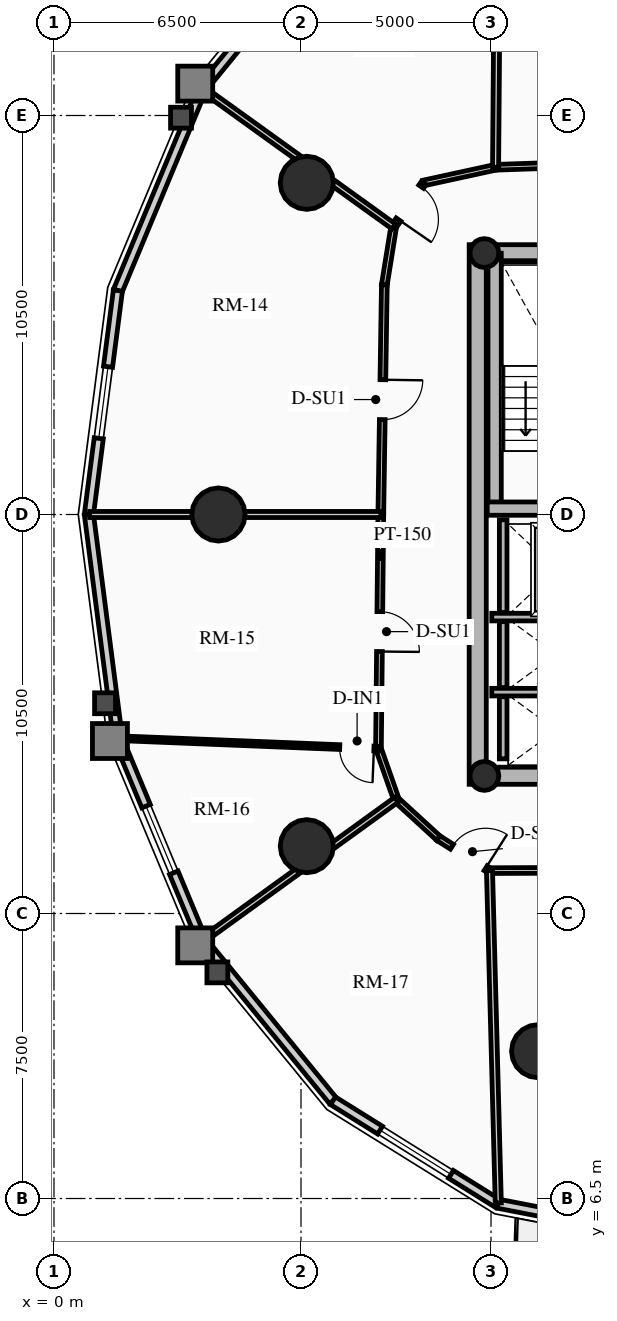
"""IFC4 building model, lengths in metres.
Left out: names, types, materials, properties, quantities, classifications, styles, units other than length and angle.
Written with IfcOpenShell. Run it as: python <this file> out.ifc"""

import sys

from ifc_helpers import new_model, si_unit, direction, frame, frame_2d, origin, origin_2d, place, context, subcontext, project, spatial, rectangle, circle, hollow_circle, extrude, source, transform, mapped, element, fill, save


model = new_model("IFC4")
c1 = context("Model", 3, precision=1e-05, world=origin(), true_north=direction((0.0, 1.0)))
c2 = subcontext(c1, "Body", "Model", "MODEL_VIEW")
j1 = project(units=[si_unit("LENGTHUNIT", "METRE"), si_unit("PLANEANGLEUNIT", "RADIAN")], contexts=[c1])
p1 = place(None, origin())
s1 = spatial("IfcSite", under=j1, at=p1, CompositionType="ELEMENT")
p2 = place(p1, origin())
s2 = spatial("IfcBuilding", under=s1, at=p2, CompositionType="ELEMENT")
p3 = place(p2, frame((0.0, 0.0, 84.7)))
s3 = spatial("IfcBuildingStorey", under=s2, at=p3, CompositionType="ELEMENT", Elevation=84.7)
p4 = place(p3, frame((11.15, 17.4, 0.0), z_axis=(0.0, 0.0, 1.0), x_axis=(0.0, 1.0, 0.0)))
e1 = element("IfcWall", 1, at=p4, inside=s3, PredefinedType="SHEAR", context=c2, shape_type="SweptSolid", body=[
    extrude(rectangle(XDim=14.2, YDim=0.45, at=frame_2d((7.1, 0.0))), origin(), (0.0, 0.0, 1.0), 2.91),
])
p5 = place(p3, frame((11.15, 17.625, 0.0), z_axis=(0.0, 0.0, 1.0), x_axis=(1.0, 0.0, 0.0)))
e2 = element("IfcWall", 2, at=p5, inside=s3, PredefinedType="SHEAR", context=c2, shape_type="SweptSolid", body=[
    extrude(rectangle(XDim=10.7, YDim=0.45, at=frame_2d((5.35, 0.0))), origin(), (0.0, 0.0, 1.0), 2.91),
])
m1 = source(origin(), c2, "Body", "SweptSolid", [
    extrude(rectangle(XDim=1.5, YDim=2.02, at=frame_2d((0.75, 1.01))), frame((0.0, 0.235, 0.0), z_axis=(0.0, -1.0, 0.0), x_axis=(1.0, 0.0, 0.0)), (0.0, 0.0, 1.0), 0.47),
])
p6 = place(p5, frame((5.45, 0.0, 0.0)))
e3 = element("IfcOpeningElement", 3, at=p6, cuts=e2, PredefinedType="OPENING", context=c2, shape_type="MappedRepresentation", body=[
    mapped(m1, transform((0.0, 0.0, 0.0), x_axis=(1.0, 0.0, 0.0), y_axis=(0.0, 1.0, 0.0), z_axis=(0.0, 0.0, 1.0), scale=1.0)),
])
p7 = place(p3, frame((11.15, 31.375, 0.0), z_axis=(0.0, 0.0, 1.0), x_axis=(1.0, 0.0, 0.0)))
e4 = element("IfcWall", 4, at=p7, inside=s3, PredefinedType="SHEAR", context=c2, shape_type="SweptSolid", body=[
    extrude(rectangle(XDim=10.7, YDim=0.45, at=frame_2d((5.35, 0.0))), origin(), (0.0, 0.0, 1.0), 2.91),
])
p8 = place(p7, frame((4.6, 0.0, 0.0)))
e5 = element("IfcOpeningElement", 5, at=p8, cuts=e4, PredefinedType="OPENING", context=c2, shape_type="MappedRepresentation", body=[
    mapped(m1, transform((0.0, 0.0, 0.0), x_axis=(1.0, 0.0, 0.0), y_axis=(0.0, 1.0, 0.0), z_axis=(0.0, 0.0, 1.0), scale=1.0)),
])
p9 = place(p3, frame((11.595, 24.655, 0.0), z_axis=(0.0, 0.0, 1.0), x_axis=(0.0, 1.0, 0.0)))
e6 = element("IfcWall", 6, at=p9, inside=s3, PredefinedType="SHEAR", context=c2, shape_type="SweptSolid", body=[
    extrude(rectangle(XDim=6.72, YDim=0.35, at=frame_2d((3.36, 0.0))), origin(), (0.0, 0.0, 1.0), 2.91),
])
p10 = place(p3, frame((11.4, 24.655, 0.0), z_axis=(0.0, 0.0, 1.0), x_axis=(1.0, 0.0, 0.0)))
e7 = element("IfcWall", 7, at=p10, inside=s3, PredefinedType="SHEAR", context=c2, shape_type="SweptSolid", body=[
    extrude(rectangle(XDim=3.285, YDim=0.35, at=frame_2d((1.643, 0.0))), origin(), (0.0, 0.0, 1.0), 2.91),
])
for number, where, z_axis, x_axis in (
    (8, (11.325, 17.62, 0.0), (0.0, 0.0, 1.0), (1.0, 0.0, 0.0)),
    (9, (11.325, 31.38, 0.0), (0.0, 0.0, 1.0), (1.0, 0.0, 0.0)),
):
    element("IfcColumn", number, at=place(p3, frame(where, z_axis=z_axis, x_axis=x_axis)), inside=s3, PredefinedType="COLUMN", context=c2, shape_type="SweptSolid", body=[
        extrude(hollow_circle(Radius=0.38, WallThickness=0.032, at=origin_2d()), origin(), (0.0, 0.0, 1.0), 2.91),
    ])
for number, where, z_axis, x_axis in (
    (10, (6.653, 33.229, 0.0), (0.0, 0.0, 1.0), (1.0, 0.0, 0.0)),
    (11, (4.328, 24.5, 0.0), (0.0, 0.0, 1.0), (1.0, 0.0, 0.0)),
    (12, (6.653, 15.771, 0.0), (0.0, 0.0, 1.0), (1.0, 0.0, 0.0)),
    (13, (12.739, 10.377, 0.0), (0.0, 0.0, 1.0), (1.0, 0.0, 0.0)),
):
    element("IfcColumn", number, at=place(p3, frame(where, z_axis=z_axis, x_axis=x_axis)), inside=s3, PredefinedType="USERDEFINED", context=c2, shape_type="SweptSolid", body=[
        extrude(circle(Radius=0.7, at=origin_2d()), origin(), (0.0, 0.0, 1.0), 2.91),
    ])
p11 = place(p3, frame((3.895, 35.709, 0.0), z_axis=(0.0, 0.0, 1.0), x_axis=(0.632700781152, 0.77439635945, 0.0)))
e14 = element("IfcWall", 14, at=p11, inside=s3, PredefinedType="SOLIDWALL", context=c2, shape_type="SweptSolid", body=[
    extrude(rectangle(XDim=5.448, YDim=0.24, at=frame_2d((2.724, 0.0))), origin(), (0.0, 0.0, 1.0), 2.179),
])
m2 = source(origin(), c2, "Body", "SweptSolid", [
    extrude(rectangle(XDim=2.2, YDim=1.35, at=frame_2d((1.1, 0.675))), frame((0.0, 0.13, 0.0), z_axis=(0.0, -1.0, 0.0), x_axis=(1.0, 0.0, 0.0)), (0.0, 0.0, 1.0), 0.26),
])
p12 = place(p11, frame((1.624, 0.0, 0.65)))
e15 = element("IfcOpeningElement", 15, at=p12, cuts=e14, PredefinedType="OPENING", context=c2, shape_type="MappedRepresentation", body=[
    mapped(m2, transform((0.0, 0.0, 0.0), x_axis=(1.0, 0.0, 0.0), y_axis=(0.0, 1.0, 0.0), z_axis=(0.0, 0.0, 1.0), scale=1.0)),
])
p13 = place(p3, frame((1.682, 30.393, 0.0), z_axis=(0.0, 0.0, 1.0), x_axis=(0.384344417632, 0.923189779317, 0.0)))
e16 = element("IfcWall", 16, at=p13, inside=s3, PredefinedType="SOLIDWALL", context=c2, shape_type="SweptSolid", body=[
    extrude(rectangle(XDim=5.758, YDim=0.24, at=frame_2d((2.879, 0.0))), origin(), (0.0, 0.0, 1.0), 2.179),
])
p14 = place(p3, frame((0.919, 24.5, 0.0), z_axis=(0.0, 0.0, 1.0), x_axis=(0.128351991996, 0.991728675672, 0.0)))
e17 = element("IfcWall", 17, at=p14, inside=s3, PredefinedType="SOLIDWALL", context=c2, shape_type="SweptSolid", body=[
    extrude(rectangle(XDim=5.942, YDim=0.24, at=frame_2d((2.971, 0.0))), origin(), (0.0, 0.0, 1.0), 2.179),
])
m3 = source(origin(), c2, "Body", "SweptSolid", [
    extrude(rectangle(XDim=1.9, YDim=1.35, at=frame_2d((0.95, 0.675))), frame((0.0, 0.13, 0.0), z_axis=(0.0, -1.0, 0.0), x_axis=(1.0, 0.0, 0.0)), (0.0, 0.0, 1.0), 0.26),
])
p15 = place(p14, frame((2.021, 0.0, 0.65)))
e18 = element("IfcOpeningElement", 18, at=p15, cuts=e17, PredefinedType="OPENING", context=c2, shape_type="MappedRepresentation", body=[
    mapped(m3, transform((0.0, 0.0, 0.0), x_axis=(1.0, 0.0, 0.0), y_axis=(0.0, 1.0, 0.0), z_axis=(0.0, 0.0, 1.0), scale=1.0)),
])
p16 = place(p3, frame((1.682, 18.607, 0.0), z_axis=(0.0, 0.0, 1.0), x_axis=(-0.128351991996, 0.991728675672, 0.0)))
e19 = element("IfcWall", 19, at=p16, inside=s3, PredefinedType="SOLIDWALL", context=c2, shape_type="SweptSolid", body=[
    extrude(rectangle(XDim=5.942, YDim=0.24, at=frame_2d((2.971, 0.0))), origin(), (0.0, 0.0, 1.0), 2.179),
])
p17 = place(p3, frame((3.895, 13.291, 0.0), z_axis=(0.0, 0.0, 1.0), x_axis=(-0.384344417632, 0.923189779317, 0.0)))
e20 = element("IfcWall", 20, at=p17, inside=s3, PredefinedType="SOLIDWALL", context=c2, shape_type="SweptSolid", body=[
    extrude(rectangle(XDim=5.758, YDim=0.24, at=frame_2d((2.879, 0.0))), origin(), (0.0, 0.0, 1.0), 2.179),
])
p18 = place(p17, frame((1.929, 0.0, 0.65)))
e21 = element("IfcOpeningElement", 21, at=p18, cuts=e20, PredefinedType="OPENING", context=c2, shape_type="MappedRepresentation", body=[
    mapped(m3, transform((0.0, 0.0, 0.0), x_axis=(1.0, 0.0, 0.0), y_axis=(0.0, 1.0, 0.0), z_axis=(0.0, 0.0, 1.0), scale=1.0)),
])
p19 = place(p3, frame((7.342, 9.072, 0.0), z_axis=(0.0, 0.0, 1.0), x_axis=(-0.632700781152, 0.77439635945, 0.0)))
e22 = element("IfcWall", 22, at=p19, inside=s3, PredefinedType="SOLIDWALL", context=c2, shape_type="SweptSolid", body=[
    extrude(rectangle(XDim=5.448, YDim=0.24, at=frame_2d((2.724, 0.0))), origin(), (0.0, 0.0, 1.0), 2.179),
])
p20 = place(p3, frame((11.685, 6.363, 0.0), z_axis=(0.0, 0.0, 1.0), x_axis=(-0.848520380187, 0.529162701263, 0.0)))
e23 = element("IfcWall", 23, at=p20, inside=s3, PredefinedType="SOLIDWALL", context=c2, shape_type="SweptSolid", body=[
    extrude(rectangle(XDim=5.119, YDim=0.24, at=frame_2d((2.56, 0.0))), origin(), (0.0, 0.0, 1.0), 2.179),
])
p21 = place(p20, frame((1.459, 0.0, 0.65)))
e24 = element("IfcOpeningElement", 24, at=p21, cuts=e23, PredefinedType="OPENING", context=c2, shape_type="MappedRepresentation", body=[
    mapped(m2, transform((0.0, 0.0, 0.0), x_axis=(1.0, 0.0, 0.0), y_axis=(0.0, 1.0, 0.0), z_axis=(0.0, 0.0, 1.0), scale=1.0)),
])
p22 = place(p3, frame((16.5, 5.43, 0.0), z_axis=(0.0, 0.0, 1.0), x_axis=(-0.981723785992, 0.190311344954, 0.0)))
e25 = element("IfcWall", 25, at=p22, inside=s3, PredefinedType="SOLIDWALL", context=c2, shape_type="SweptSolid", body=[
    extrude(rectangle(XDim=4.904, YDim=0.24, at=frame_2d((2.452, 0.0))), origin(), (0.0, 0.0, 1.0), 2.179),
])
m4 = source(origin(), c2, "Body", "SweptSolid", [
    extrude(rectangle(XDim=1.15, YDim=2.005, at=frame_2d((0.575, 1.002))), frame((0.0, 0.13, 0.0), z_axis=(0.0, -1.0, 0.0), x_axis=(1.0, 0.0, 0.0)), (0.0, 0.0, 1.0), 0.26),
])
p23 = place(p22, frame((1.877, 0.0, 0.0)))
e26 = element("IfcOpeningElement", 26, at=p23, cuts=e25, PredefinedType="OPENING", context=c2, shape_type="MappedRepresentation", body=[
    mapped(m4, transform((0.0, 0.0, 0.0), x_axis=(1.0, 0.0, 0.0), y_axis=(0.0, 1.0, 0.0), z_axis=(0.0, 0.0, 1.0), scale=1.0)),
])
p24 = place(p3, frame((11.52, 21.8, 0.0), z_axis=(0.0, 0.0, 1.0), x_axis=(1.0, 0.0, 0.0)))
e27 = element("IfcWall", 27, at=p24, inside=s3, PredefinedType="SHEAR", context=c2, shape_type="SweptSolid", body=[
    extrude(rectangle(XDim=2.97, YDim=0.2, at=frame_2d((1.485, 0.0))), origin(), (0.0, 0.0, 1.0), 2.91),
])
p25 = place(p3, frame((11.82, 21.92, 0.0), z_axis=(0.0, 0.0, 1.0), x_axis=(0.0, 1.0, 0.0)))
e28 = element("IfcWall", 28, at=p25, inside=s3, PredefinedType="SHEAR", context=c2, shape_type="SweptSolid", body=[
    extrude(rectangle(XDim=2.44, YDim=0.2, at=frame_2d((1.22, 0.0))), origin(), (0.0, 0.0, 1.0), 2.91),
])
p26 = place(p3, frame((11.52, 19.825, 0.0), z_axis=(0.0, 0.0, 1.0), x_axis=(1.0, 0.0, 0.0)))
e29 = element("IfcWall", 29, at=p26, inside=s3, PredefinedType="SHEAR", context=c2, shape_type="SweptSolid", body=[
    extrude(rectangle(XDim=2.97, YDim=0.2, at=frame_2d((1.485, 0.0))), origin(), (0.0, 0.0, 1.0), 2.91),
])
p27 = place(p3, frame((11.82, 19.945, 0.0), z_axis=(0.0, 0.0, 1.0), x_axis=(0.0, 1.0, 0.0)))
e30 = element("IfcWall", 30, at=p27, inside=s3, PredefinedType="SHEAR", context=c2, shape_type="SweptSolid", body=[
    extrude(rectangle(XDim=1.735, YDim=0.2, at=frame_2d((0.867, 0.0))), origin(), (0.0, 0.0, 1.0), 2.91),
])
p28 = place(p3, frame((11.82, 18.07, 0.0), z_axis=(0.0, 0.0, 1.0), x_axis=(0.0, 1.0, 0.0)))
e31 = element("IfcWall", 31, at=p28, inside=s3, PredefinedType="SHEAR", context=c2, shape_type="SweptSolid", body=[
    extrude(rectangle(XDim=1.635, YDim=0.2, at=frame_2d((0.817, 0.0))), origin(), (0.0, 0.0, 1.0), 2.91),
])
p29 = place(p3, frame((18.143, 33.86, 0.0), z_axis=(0.0, 0.0, 1.0), x_axis=(-0.999419208319, -0.034077060363, 0.0)))
e32 = element("IfcWall", 32, at=p29, inside=s3, PredefinedType="PARTITIONING", context=c2, shape_type="SweptSolid", body=[
    extrude(rectangle(XDim=6.527, YDim=0.15, at=frame_2d((3.263, 0.0))), origin(), (0.0, 0.0, 1.0), 2.225),
])
m5 = source(origin(), c2, "Body", "SweptSolid", [
    extrude(rectangle(XDim=1.05, YDim=2.015, at=frame_2d((0.525, 1.007))), frame((0.0, 0.085, 0.0), z_axis=(0.0, -1.0, 0.0), x_axis=(1.0, 0.0, 0.0)), (0.0, 0.0, 1.0), 0.17),
])
p30 = place(p29, frame((2.738, 0.0, 0.0)))
e33 = element("IfcOpeningElement", 33, at=p30, cuts=e32, PredefinedType="OPENING", context=c2, shape_type="MappedRepresentation", body=[
    mapped(m5, transform((0.0, 0.0, 0.0), x_axis=(1.0, 0.0, 0.0), y_axis=(0.0, 1.0, 0.0), z_axis=(0.0, 0.0, 1.0), scale=1.0)),
])
p31 = place(p3, frame((11.62, 33.637, 0.0), z_axis=(0.0, 0.0, 1.0), x_axis=(-0.97702579435, -0.213121085711, 0.0)))
e34 = element("IfcWall", 34, at=p31, inside=s3, PredefinedType="PARTITIONING", context=c2, shape_type="SweptSolid", body=[
    extrude(rectangle(XDim=1.935, YDim=0.15, at=frame_2d((0.967, 0.0))), origin(), (0.0, 0.0, 1.0), 2.225),
])
p32 = place(p3, frame((9.729, 33.225, 0.0), z_axis=(0.0, 0.0, 1.0), x_axis=(-0.567183649484, -0.82359134755, 0.0)))
e35 = element("IfcWall", 35, at=p32, inside=s3, PredefinedType="PARTITIONING", context=c2, shape_type="SweptSolid", body=[
    extrude(rectangle(XDim=1.392, YDim=0.15, at=frame_2d((0.696, 0.0))), origin(), (0.0, 0.0, 1.0), 2.225),
])
p33 = place(p32, frame((0.12, 0.0, 0.0)))
e36 = element("IfcOpeningElement", 36, at=p33, cuts=e35, PredefinedType="OPENING", context=c2, shape_type="MappedRepresentation", body=[
    mapped(m5, transform((0.0, 0.0, 0.0), x_axis=(1.0, 0.0, 0.0), y_axis=(0.0, 1.0, 0.0), z_axis=(0.0, 0.0, 1.0), scale=1.0)),
])
p34 = place(p3, frame((8.94, 32.078, 0.0), z_axis=(0.0, 0.0, 1.0), x_axis=(-0.159148467753, -0.98725466077, 0.0)))
e37 = element("IfcWall", 37, at=p34, inside=s3, PredefinedType="PARTITIONING", context=c2, shape_type="SweptSolid", body=[
    extrude(rectangle(XDim=1.554, YDim=0.15, at=frame_2d((0.777, 0.0))), origin(), (0.0, 0.0, 1.0), 2.225),
])
p35 = place(p3, frame((8.693, 30.544, 0.0), z_axis=(0.0, 0.0, 1.0), x_axis=(-0.015307007986, -0.99988284089, 0.0)))
e38 = element("IfcWall", 38, at=p35, inside=s3, PredefinedType="PARTITIONING", context=c2, shape_type="SweptSolid", body=[
    extrude(rectangle(XDim=6.045, YDim=0.15, at=frame_2d((3.022, 0.0))), origin(), (0.0, 0.0, 1.0), 2.655),
])
p36 = place(p35, frame((2.497, 0.0, 0.0)))
e39 = element("IfcOpeningElement", 39, at=p36, cuts=e38, PredefinedType="OPENING", context=c2, shape_type="MappedRepresentation", body=[
    mapped(m5, transform((0.0, 0.0, 0.0), x_axis=(1.0, 0.0, 0.0), y_axis=(0.0, 1.0, 0.0), z_axis=(0.0, 0.0, 1.0), scale=1.0)),
])
p37 = place(p3, frame((8.6, 24.5, 0.0), z_axis=(0.0, 0.0, 1.0), x_axis=(-0.010023665349, -0.999949761805, 0.0)))
e40 = element("IfcWall", 40, at=p37, inside=s3, PredefinedType="PARTITIONING", context=c2, shape_type="SweptSolid", body=[
    extrude(rectangle(XDim=6.162, YDim=0.15, at=frame_2d((3.081, 0.0))), origin(), (0.0, 0.0, 1.0), 2.225),
])
p38 = place(p37, frame((2.556, 0.0, 0.0)))
e41 = element("IfcOpeningElement", 41, at=p38, cuts=e40, PredefinedType="OPENING", context=c2, shape_type="MappedRepresentation", body=[
    mapped(m5, transform((0.0, 0.0, 0.0), x_axis=(1.0, 0.0, 0.0), y_axis=(0.0, 1.0, 0.0), z_axis=(0.0, 0.0, 1.0), scale=1.0)),
])
p39 = place(p3, frame((8.538, 18.338, 0.0), z_axis=(0.0, 0.0, 1.0), x_axis=(0.331358150167, -0.94350504838, 0.0)))
e42 = element("IfcWall", 42, at=p39, inside=s3, PredefinedType="PARTITIONING", context=c2, shape_type="SweptSolid", body=[
    extrude(rectangle(XDim=1.424, YDim=0.15, at=frame_2d((0.712, 0.0))), origin(), (0.0, 0.0, 1.0), 2.225),
])
p40 = place(p3, frame((9.01, 16.994, 0.0), z_axis=(0.0, 0.0, 1.0), x_axis=(0.737701798986, -0.67512669609, 0.0)))
e43 = element("IfcWall", 43, at=p40, inside=s3, PredefinedType="PARTITIONING", context=c2, shape_type="SweptSolid", body=[
    extrude(rectangle(XDim=1.498, YDim=0.15, at=frame_2d((0.749, 0.0))), origin(), (0.0, 0.0, 1.0), 2.225),
])
p41 = place(p3, frame((10.115, 15.983, 0.0), z_axis=(0.0, 0.0, 1.0), x_axis=(0.843995849351, -0.536349705209, 0.0)))
e44 = element("IfcWall", 44, at=p41, inside=s3, PredefinedType="PARTITIONING", context=c2, shape_type="SweptSolid", body=[
    extrude(rectangle(XDim=1.593, YDim=0.15, at=frame_2d((0.796, 0.0))), origin(), (0.0, 0.0, 1.0), 2.225),
])
p42 = place(p41, frame((0.423, 0.0, 0.0)))
e45 = element("IfcOpeningElement", 45, at=p42, cuts=e44, PredefinedType="OPENING", context=c2, shape_type="MappedRepresentation", body=[
    mapped(m5, transform((0.0, 0.0, 0.0), x_axis=(1.0, 0.0, 0.0), y_axis=(0.0, 1.0, 0.0), z_axis=(0.0, 0.0, 1.0), scale=1.0)),
])
p43 = place(p3, frame((11.46, 15.129, 0.0), z_axis=(0.0, 0.0, 1.0), x_axis=(0.999993513287, 0.003601858435, 0.0)))
e46 = element("IfcWall", 46, at=p43, inside=s3, PredefinedType="PARTITIONING", context=c2, shape_type="SweptSolid", body=[
    extrude(rectangle(XDim=3.321, YDim=0.15, at=frame_2d((1.661, 0.0))), origin(), (0.0, 0.0, 1.0), 2.225),
])
p44 = place(p3, frame((11.62, 33.637, 0.0), z_axis=(0.0, 0.0, 1.0), x_axis=(0.007965167065, 0.999968277554, 0.0)))
e47 = element("IfcWall", 47, at=p44, inside=s3, PredefinedType="PARTITIONING", context=c2, shape_type="SweptSolid", body=[
    extrude(rectangle(XDim=8.981, YDim=0.16, at=frame_2d((4.49, 0.0))), origin(), (0.0, 0.0, 1.0), 2.179),
])
p45 = place(p3, frame((8.94, 32.078, 0.0), z_axis=(0.0, 0.0, 1.0), x_axis=(-0.811689023641, 0.584089829479, 0.0)))
e48 = element("IfcWall", 48, at=p45, inside=s3, PredefinedType="PARTITIONING", context=c2, shape_type="SweptSolid", body=[
    extrude(rectangle(XDim=6.196, YDim=0.16, at=frame_2d((3.098, 0.0))), origin(), (0.0, 0.0, 1.0), 2.179),
])
p46 = place(p3, frame((8.6, 24.5, 0.0), z_axis=(0.0, 0.0, 1.0), x_axis=(-1.0, 0.0, 0.0)))
e49 = element("IfcWall", 49, at=p46, inside=s3, PredefinedType="PARTITIONING", context=c2, shape_type="SweptSolid", body=[
    extrude(rectangle(XDim=7.661, YDim=0.16, at=frame_2d((3.831, 0.0))), origin(), (0.0, 0.0, 1.0), 2.179),
])
p47 = place(p3, frame((9.01, 16.994, 0.0), z_axis=(0.0, 0.0, 1.0), x_axis=(-0.81001707524, -0.586406290741, 0.0)))
e50 = element("IfcWall", 50, at=p47, inside=s3, PredefinedType="PARTITIONING", context=c2, shape_type="SweptSolid", body=[
    extrude(rectangle(XDim=6.295, YDim=0.16, at=frame_2d((3.148, 0.0))), origin(), (0.0, 0.0, 1.0), 2.179),
])
p48 = place(p3, frame((11.46, 15.129, 0.0), z_axis=(0.0, 0.0, 1.0), x_axis=(0.026480592098, -0.999649327636, 0.0)))
e51 = element("IfcWall", 51, at=p48, inside=s3, PredefinedType="PARTITIONING", context=c2, shape_type="SweptSolid", body=[
    extrude(rectangle(XDim=8.75, YDim=0.16, at=frame_2d((4.375, 0.0))), origin(), (0.0, 0.0, 1.0), 2.179),
])
p49 = place(p3, frame((8.538, 18.338, 0.0), z_axis=(0.0, 0.0, 1.0), x_axis=(-0.999191355531, 0.04020740021, 0.0)))
e52 = element("IfcWall", 52, at=p49, inside=s3, PredefinedType="PARTITIONING", context=c2, shape_type="SweptSolid", body=[
    extrude(rectangle(XDim=6.843, YDim=0.125, at=frame_2d((3.422, 0.0))), origin(), (0.0, 0.0, 1.0), 2.179),
])
m6 = source(origin(), c2, "Body", "SweptSolid", [
    extrude(rectangle(XDim=0.9, YDim=2.005, at=frame_2d((0.45, 1.002))), frame((0.0, 0.073, 0.0), z_axis=(0.0, -1.0, 0.0), x_axis=(1.0, 0.0, 0.0)), (0.0, 0.0, 1.0), 0.145),
])
p50 = place(p49, frame((0.12, 0.0, 0.0)))
e53 = element("IfcOpeningElement", 53, at=p50, cuts=e52, PredefinedType="OPENING", context=c2, shape_type="MappedRepresentation", body=[
    mapped(m6, transform((0.0, 0.0, 0.0), x_axis=(1.0, 0.0, 0.0), y_axis=(0.0, 1.0, 0.0), z_axis=(0.0, 0.0, 1.0), scale=1.0)),
])
m7 = source(origin(), c2, "Body", "SweptSolid", [
    extrude(rectangle(XDim=1.9, YDim=1.35, at=frame_2d((0.95, 0.675))), frame((0.0, 0.03, 0.0), z_axis=(0.0, -1.0, 0.0), x_axis=(1.0, 0.0, 0.0)), (0.0, 0.0, 1.0), 0.06),
])
p51 = place(p15, origin())
e54 = element("IfcWindow", 54, at=p51, inside=s3, PartitioningType="DOUBLE_PANEL_VERTICAL", PredefinedType="WINDOW", context=c2, shape_type="MappedRepresentation", body=[
    mapped(m7, transform((0.0, 0.0, 0.0), x_axis=(1.0, 0.0, 0.0), y_axis=(0.0, 1.0, 0.0), z_axis=(0.0, 0.0, 1.0), scale=1.0)),
])
fill(e18, e54)
p52 = place(p18, origin())
e55 = element("IfcWindow", 55, at=p52, inside=s3, PartitioningType="DOUBLE_PANEL_VERTICAL", PredefinedType="WINDOW", context=c2, shape_type="MappedRepresentation", body=[
    mapped(m7, transform((0.0, 0.0, 0.0), x_axis=(1.0, 0.0, 0.0), y_axis=(0.0, 1.0, 0.0), z_axis=(0.0, 0.0, 1.0), scale=1.0)),
])
fill(e21, e55)
m8 = source(origin(), c2, "Body", "SweptSolid", [
    extrude(rectangle(XDim=2.2, YDim=1.35, at=frame_2d((1.1, 0.675))), frame((0.0, 0.03, 0.0), z_axis=(0.0, -1.0, 0.0), x_axis=(1.0, 0.0, 0.0)), (0.0, 0.0, 1.0), 0.06),
])
p53 = place(p21, origin())
e56 = element("IfcWindow", 56, at=p53, inside=s3, PartitioningType="DOUBLE_PANEL_VERTICAL", PredefinedType="WINDOW", context=c2, shape_type="MappedRepresentation", body=[
    mapped(m8, transform((0.0, 0.0, 0.0), x_axis=(1.0, 0.0, 0.0), y_axis=(0.0, 1.0, 0.0), z_axis=(0.0, 0.0, 1.0), scale=1.0)),
])
fill(e24, e56)
m9 = source(origin(), c2, "Body", "SweptSolid", [
    extrude(rectangle(XDim=1.05, YDim=2.015, at=frame_2d((0.525, 1.007))), frame((0.0, 0.025, 0.0), z_axis=(0.0, -1.0, 0.0), x_axis=(1.0, 0.0, 0.0)), (0.0, 0.0, 1.0), 0.05),
])
p54 = place(p33, origin())
e57 = element("IfcDoor", 57, at=p54, inside=s3, OperationType="SINGLE_SWING_RIGHT", PredefinedType="DOOR", context=c2, shape_type="MappedRepresentation", body=[
    mapped(m9, transform((0.0, 0.0, 0.0), x_axis=(1.0, 0.0, 0.0), y_axis=(0.0, 1.0, 0.0), z_axis=(0.0, 0.0, 1.0), scale=1.0)),
])
fill(e36, e57)
p55 = place(p36, origin())
e58 = element("IfcDoor", 58, at=p55, inside=s3, OperationType="SINGLE_SWING_LEFT", PredefinedType="DOOR", context=c2, shape_type="MappedRepresentation", body=[
    mapped(m9, transform((0.0, 0.0, 0.0), x_axis=(1.0, 0.0, 0.0), y_axis=(0.0, 1.0, 0.0), z_axis=(0.0, 0.0, 1.0), scale=1.0)),
])
fill(e39, e58)
p56 = place(p38, origin())
e59 = element("IfcDoor", 59, at=p56, inside=s3, OperationType="SINGLE_SWING_RIGHT", PredefinedType="DOOR", context=c2, shape_type="MappedRepresentation", body=[
    mapped(m9, transform((0.0, 0.0, 0.0), x_axis=(1.0, 0.0, 0.0), y_axis=(0.0, 1.0, 0.0), z_axis=(0.0, 0.0, 1.0), scale=1.0)),
])
fill(e41, e59)
m10 = source(origin(), c2, "Body", "SweptSolid", [
    extrude(rectangle(XDim=0.9, YDim=2.005, at=frame_2d((0.45, 1.002))), frame((0.0, 0.025, 0.0), z_axis=(0.0, -1.0, 0.0), x_axis=(1.0, 0.0, 0.0)), (0.0, 0.0, 1.0), 0.05),
])
p57 = place(p50, origin())
e60 = element("IfcDoor", 60, at=p57, inside=s3, OperationType="SINGLE_SWING_LEFT", PredefinedType="DOOR", context=c2, shape_type="MappedRepresentation", body=[
    mapped(m10, transform((0.0, 0.0, 0.0), x_axis=(1.0, 0.0, 0.0), y_axis=(0.0, 1.0, 0.0), z_axis=(0.0, 0.0, 1.0), scale=1.0)),
])
fill(e53, e60)
p58 = place(p42, origin())
e61 = element("IfcDoor", 61, at=p58, inside=s3, OperationType="SINGLE_SWING_RIGHT", PredefinedType="DOOR", context=c2, shape_type="MappedRepresentation", body=[
    mapped(m9, transform((0.0, 0.0, 0.0), x_axis=(1.0, 0.0, 0.0), y_axis=(0.0, 1.0, 0.0), z_axis=(0.0, 0.0, 1.0), scale=1.0)),
])
fill(e45, e61)
save(model, sys.argv[1])
